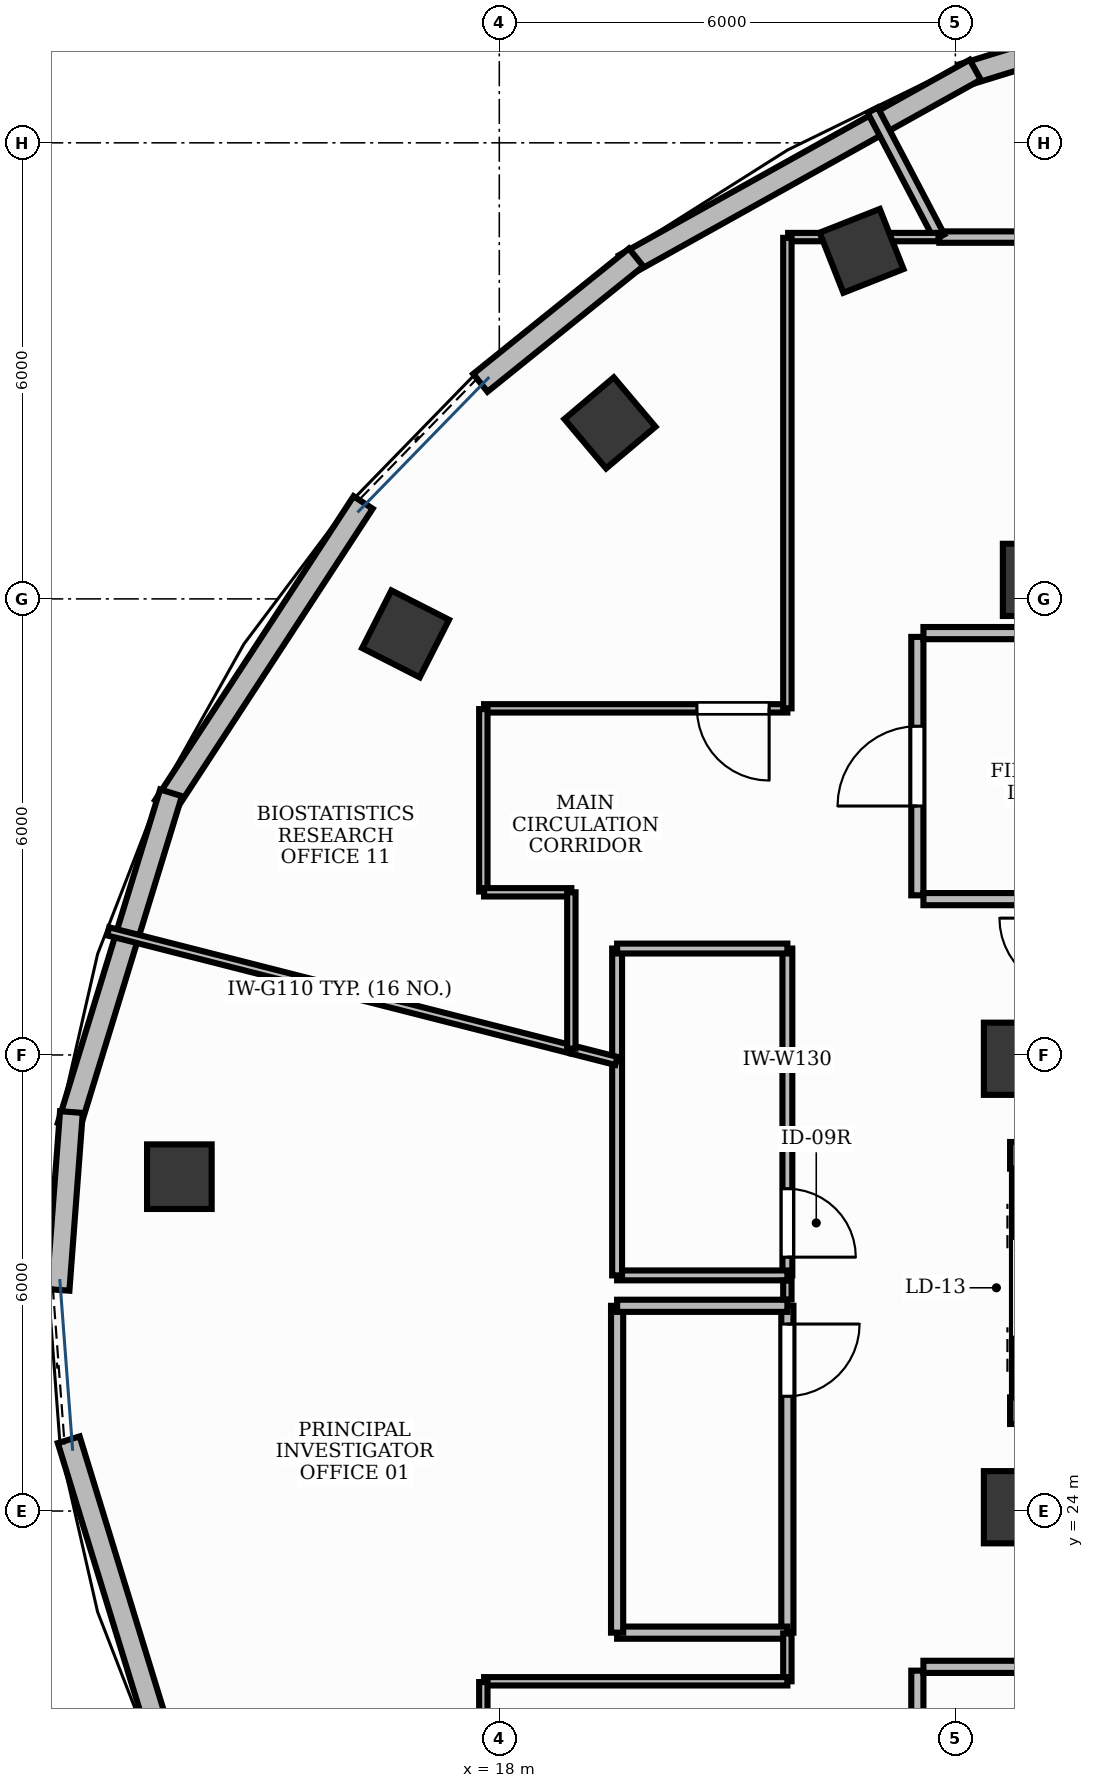
"""IFC4 building model, lengths in metres.
Left out: names, types, materials, properties, quantities, classifications, styles, units other than length and angle.
Written with IfcOpenShell. Run it as: python <this file> out.ifc"""

import sys

from ifc_helpers import new_model, si_unit, direction, frame, frame_2d, origin, origin_2d, place, context, subcontext, project, spatial, rectangle, extrude, element, fill, save


model = new_model("IFC4")
c1 = context("Model", 3, precision=1e-05, world=origin(), true_north=direction((0.0, 1.0)))
c2 = subcontext(c1, "Body", "Model", "MODEL_VIEW")
j1 = project(units=[si_unit("LENGTHUNIT", "METRE"), si_unit("PLANEANGLEUNIT", "RADIAN")], contexts=[c1])
p1 = place(None, origin())
s1 = spatial("IfcSite", under=j1, at=p1, CompositionType="ELEMENT")
p2 = place(p1, origin())
s2 = spatial("IfcBuilding", under=s1, at=p2, CompositionType="ELEMENT")
p3 = place(p2, frame((0.0, 0.0, 306.0)))
s3 = spatial("IfcBuildingStorey", under=s2, at=p3, CompositionType="ELEMENT", Elevation=306.0)
for number, where, z_axis, x_axis in (
    (1, (24.72, 28.68, 0.0), (0.0, 0.0, 1.0), (1.0, 0.0, 0.0)),
    (2, (24.72, 25.32, 0.0), (0.0, 0.0, 1.0), (1.0, 0.0, 0.0)),
):
    element("IfcWall", number, at=place(p3, frame(where, z_axis=z_axis, x_axis=x_axis)), inside=s3, PredefinedType="SHEAR", context=c2, shape_type="SweptSolid", body=[
        extrude(rectangle(XDim=3.21, YDim=0.35, at=frame_2d((1.605, 0.0))), origin(), (0.0, 0.0, 1.0), 3.9),
    ])
p4 = place(p3, frame((24.92, 25.497, 0.0), z_axis=(0.0, 0.0, 1.0), x_axis=(0.0, 1.0, 0.0)))
e3 = element("IfcWall", 3, at=p4, inside=s3, PredefinedType="SHEAR", context=c2, shape_type="SweptSolid", body=[
    extrude(rectangle(XDim=3.006, YDim=0.35, at=frame_2d((1.503, 0.0))), origin(), (0.0, 0.0, 1.0), 3.9),
])
p5 = place(p4, frame((0.79, 0.0, 0.0)))
e4 = element("IfcOpeningElement", 4, at=p5, cuts=e3, PredefinedType="OPENING", context=c2, shape_type="SweptSolid", body=[
    extrude(rectangle(XDim=1.3, YDim=2.2, at=frame_2d((0.65, 1.1))), frame((0.0, 0.19, 0.0), z_axis=(0.0, -1.0, 0.0), x_axis=(1.0, 0.0, 0.0)), (0.0, 0.0, 1.0), 0.38),
])
for number, where, z_axis, x_axis in (
    (5, (25.1, 36.25, -0.0), (0.0, 0.0, 1.0), (1.0, 0.0, 0.0)),
    (6, (24.85, 29.95, -0.0), (0.0, 0.0, 1.0), (1.0, 0.0, 0.0)),
    (7, (24.85, 24.05, -0.0), (0.0, 0.0, 1.0), (1.0, 0.0, 0.0)),
):
    element("IfcColumn", number, at=place(p3, frame(where, z_axis=z_axis, x_axis=x_axis)), inside=s3, PredefinedType="PILASTER", context=c2, shape_type="SweptSolid", body=[
        extrude(rectangle(XDim=0.95, YDim=0.95, at=origin_2d()), origin(), (0.0, 0.0, 1.0), 3.901),
    ])
for number, where, z_axis, x_axis in (
    (8, (22.766, 40.579, -0.0), (0.0, 0.0, 1.0), (0.93, 0.367, 0.0)),
    (9, (19.456, 38.315, -0.0), (0.0, 0.0, 1.0), (0.764, 0.645, 0.0)),
    (10, (16.767, 35.54, -0.0), (0.0, 0.0, 1.0), (0.453, 0.891, 0.0)),
    (11, (13.791, 28.399, -0.0), (0.0, 0.0, 1.0), (0.0, 1.0, 0.0)),
):
    element("IfcColumn", number, at=place(p3, frame(where, z_axis=z_axis, x_axis=x_axis)), inside=s3, PredefinedType="COLUMN", context=c2, shape_type="SweptSolid", body=[
        extrude(rectangle(XDim=0.85, YDim=0.85, at=origin_2d()), origin(), (0.0, 0.0, 1.0), 3.901),
    ])
p6 = place(p3, frame((29.33, 44.505, 0.0), z_axis=(0.0, 0.0, 1.0), x_axis=(-0.955535200816, -0.29487705913, 0.0)))
e12 = element("IfcWall", 12, at=p6, inside=s3, PredefinedType="STANDARD", context=c2, shape_type="SweptSolid", body=[
    extrude(rectangle(XDim=5.485, YDim=0.3, at=frame_2d((2.743, 0.0))), origin(), (0.0, 0.0, 1.0), 3.47),
])
p7 = place(p3, frame((24.262, 42.962, 0.0), z_axis=(0.0, 0.0, 1.0), x_axis=(-0.87350676692, -0.486812004932, 0.0)))
e13 = element("IfcWall", 13, at=p7, inside=s3, PredefinedType="STANDARD", context=c2, shape_type="SweptSolid", body=[
    extrude(rectangle(XDim=5.282, YDim=0.3, at=frame_2d((2.641, 0.0))), origin(), (0.0, 0.0, 1.0), 3.47),
])
p8 = place(p3, frame((19.8, 40.493, 0.0), z_axis=(0.0, 0.0, 1.0), x_axis=(-0.778800498168, -0.627271698751, 0.0)))
e14 = element("IfcWall", 14, at=p8, inside=s3, PredefinedType="STANDARD", context=c2, shape_type="SweptSolid", body=[
    extrude(rectangle(XDim=2.631, YDim=0.3, at=frame_2d((1.315, 0.0))), origin(), (0.0, 0.0, 1.0), 3.9),
])
p9 = place(p3, frame((16.208, 37.269, 0.0), z_axis=(0.0, 0.0, 1.0), x_axis=(-0.546723072071, -0.837313491152, 0.0)))
e15 = element("IfcWall", 15, at=p9, inside=s3, PredefinedType="STANDARD", context=c2, shape_type="SweptSolid", body=[
    extrude(rectangle(XDim=4.775, YDim=0.3, at=frame_2d((2.388, 0.0))), origin(), (0.0, 0.0, 1.0), 3.9),
])
p10 = place(p3, frame((13.681, 33.449, 0.0), z_axis=(0.0, 0.0, 1.0), x_axis=(-0.293311854667, -0.956016817797, 0.0)))
e16 = element("IfcWall", 16, at=p10, inside=s3, PredefinedType="STANDARD", context=c2, shape_type="SweptSolid", body=[
    extrude(rectangle(XDim=4.589, YDim=0.3, at=frame_2d((2.294, 0.0))), origin(), (0.0, 0.0, 1.0), 3.9),
])
p11 = place(p3, frame((12.371, 29.249, 0.0), z_axis=(0.0, 0.0, 1.0), x_axis=(-0.075040925575, -0.997180454827, 0.0)))
e17 = element("IfcWall", 17, at=p11, inside=s3, PredefinedType="STANDARD", context=c2, shape_type="SweptSolid", body=[
    extrude(rectangle(XDim=2.346, YDim=0.3, at=frame_2d((1.173, 0.0))), origin(), (0.0, 0.0, 1.0), 3.9),
])
p12 = place(p3, frame((12.335, 24.938, 0.0), z_axis=(0.0, 0.0, 1.0), x_axis=(0.293311854667, -0.956016817797, 0.0)))
e18 = element("IfcWall", 18, at=p12, inside=s3, PredefinedType="STANDARD", context=c2, shape_type="SweptSolid", body=[
    extrude(rectangle(XDim=4.589, YDim=0.3, at=frame_2d((2.294, 0.0))), origin(), (0.0, 0.0, 1.0), 3.9),
])
p13 = place(p3, frame((23.5, 32.1, 0.0), z_axis=(0.0, 0.0, 1.0), x_axis=(0.0, 1.0, 0.0)))
e19 = element("IfcWall", 19, at=p13, inside=s3, PredefinedType="PARTITIONING", context=c2, shape_type="SweptSolid", body=[
    extrude(rectangle(XDim=3.4, YDim=0.16, at=frame_2d((1.7, 0.0))), origin(), (0.0, 0.0, 1.0), 2.91),
])
p14 = place(p13, frame((1.175, 0.0, 0.0)))
e20 = element("IfcOpeningElement", 20, at=p14, cuts=e19, PredefinedType="OPENING", context=c2, shape_type="SweptSolid", body=[
    extrude(rectangle(XDim=1.05, YDim=2.15, at=frame_2d((0.525, 1.075))), frame((0.0, 0.095, 0.0), z_axis=(0.0, -1.0, 0.0), x_axis=(1.0, 0.0, 0.0)), (0.0, 0.0, 1.0), 0.19),
])
p15 = place(p3, frame((23.5, 18.5, 0.0), z_axis=(0.0, 0.0, 1.0), x_axis=(0.0, 1.0, 0.0)))
e21 = element("IfcWall", 21, at=p15, inside=s3, PredefinedType="PARTITIONING", context=c2, shape_type="SweptSolid", body=[
    extrude(rectangle(XDim=3.4, YDim=0.16, at=frame_2d((1.7, 0.0))), origin(), (0.0, 0.0, 1.0), 2.91),
])
p16 = place(p15, frame((1.175, 0.0, 0.0)))
e22 = element("IfcOpeningElement", 22, at=p16, cuts=e21, PredefinedType="OPENING", context=c2, shape_type="SweptSolid", body=[
    extrude(rectangle(XDim=1.05, YDim=2.15, at=frame_2d((0.525, 1.075))), frame((0.0, 0.095, 0.0), z_axis=(0.0, -1.0, 0.0), x_axis=(1.0, 0.0, 0.0)), (0.0, 0.0, 1.0), 0.19),
])
p17 = place(p3, frame((23.58, 32.05, 0.0), z_axis=(0.0, 0.0, 1.0), x_axis=(1.0, 0.0, 0.0)))
e23 = element("IfcWall", 23, at=p17, inside=s3, PredefinedType="PARTITIONING", context=c2, shape_type="SweptSolid", body=[
    extrude(rectangle(XDim=4.97, YDim=0.16, at=frame_2d((2.485, 0.0))), origin(), (0.0, 0.0, 1.0), 2.91),
])
p18 = place(p3, frame((23.58, 35.55, 0.0), z_axis=(0.0, 0.0, 1.0), x_axis=(1.0, 0.0, 0.0)))
e24 = element("IfcWall", 24, at=p18, inside=s3, PredefinedType="PARTITIONING", context=c2, shape_type="SweptSolid", body=[
    extrude(rectangle(XDim=2.12, YDim=0.16, at=frame_2d((1.06, 0.0))), origin(), (0.0, 0.0, 1.0), 2.91),
])
p19 = place(p3, frame((23.58, 21.95, 0.0), z_axis=(0.0, 0.0, 1.0), x_axis=(1.0, 0.0, 0.0)))
e25 = element("IfcWall", 25, at=p19, inside=s3, PredefinedType="PARTITIONING", context=c2, shape_type="SweptSolid", body=[
    extrude(rectangle(XDim=4.97, YDim=0.16, at=frame_2d((2.485, 0.0))), origin(), (0.0, 0.0, 1.0), 2.91),
])
p20 = place(p3, frame((21.79, 26.7, 0.0), z_axis=(0.0, 0.0, 1.0), x_axis=(0.0, -1.0, 0.0)))
e26 = element("IfcWall", 26, at=p20, inside=s3, PredefinedType="PARTITIONING", context=c2, shape_type="SweptSolid", body=[
    extrude(rectangle(XDim=4.3, YDim=0.16, at=frame_2d((2.15, 0.0))), origin(), (0.0, 0.0, 1.0), 2.91),
])
p21 = place(p20, frame((0.24, 0.0, 0.0)))
e27 = element("IfcOpeningElement", 27, at=p21, cuts=e26, PredefinedType="OPENING", context=c2, shape_type="SweptSolid", body=[
    extrude(rectangle(XDim=0.95, YDim=2.15, at=frame_2d((0.475, 1.075))), frame((0.0, 0.095, 0.0), z_axis=(0.0, -1.0, 0.0), x_axis=(1.0, 0.0, 0.0)), (0.0, 0.0, 1.0), 0.19),
])
p22 = place(p3, frame((21.79, 31.4, 0.0), z_axis=(0.0, 0.0, 1.0), x_axis=(0.0, -1.0, 0.0)))
e28 = element("IfcWall", 28, at=p22, inside=s3, PredefinedType="PARTITIONING", context=c2, shape_type="SweptSolid", body=[
    extrude(rectangle(XDim=4.3, YDim=0.13, at=frame_2d((2.15, 0.0))), origin(), (0.0, 0.0, 1.0), 2.91),
])
p23 = place(p22, frame((3.16, 0.0, 0.0)))
e29 = element("IfcOpeningElement", 29, at=p23, cuts=e28, PredefinedType="OPENING", context=c2, shape_type="SweptSolid", body=[
    extrude(rectangle(XDim=0.9, YDim=2.15, at=frame_2d((0.45, 1.075))), frame((0.0, 0.08, 0.0), z_axis=(0.0, -1.0, 0.0), x_axis=(1.0, 0.0, 0.0)), (0.0, 0.0, 1.0), 0.16),
])
p24 = place(p3, frame((39.4, 40.76, 0.0), z_axis=(0.0, 0.0, 1.0), x_axis=(-1.0, 0.0, 0.0)))
e30 = element("IfcWall", 30, at=p24, inside=s3, PredefinedType="PARTITIONING", context=c2, shape_type="SweptSolid", body=[
    extrude(rectangle(XDim=15.611, YDim=0.15, at=frame_2d((7.805, 0.0))), origin(), (0.0, 0.0, 1.0), 2.91),
])
p25 = place(p24, frame((2.944, 0.0, 0.0)))
e31 = element("IfcOpeningElement", 31, at=p25, cuts=e30, PredefinedType="OPENING", context=c2, shape_type="SweptSolid", body=[
    extrude(rectangle(XDim=0.95, YDim=2.15, at=frame_2d((0.475, 1.075))), frame((0.0, 0.09, 0.0), z_axis=(0.0, -1.0, 0.0), x_axis=(1.0, 0.0, 0.0)), (0.0, 0.0, 1.0), 0.18),
])
p26 = place(p3, frame((21.79, 34.56, 0.0), z_axis=(0.0, 0.0, 1.0), x_axis=(-1.0, 0.0, 0.0)))
e32 = element("IfcWall", 32, at=p26, inside=s3, PredefinedType="MOVABLE", context=c2, shape_type="SweptSolid", body=[
    extrude(rectangle(XDim=3.99, YDim=0.11, at=frame_2d((1.995, 0.0))), origin(), (0.0, 0.0, 1.0), 2.91),
])
p27 = place(p26, frame((0.24, 0.0, 0.0)))
e33 = element("IfcOpeningElement", 33, at=p27, cuts=e32, PredefinedType="OPENING", context=c2, shape_type="SweptSolid", body=[
    extrude(rectangle(XDim=0.95, YDim=2.15, at=frame_2d((0.475, 1.075))), frame((0.0, 0.07, 0.0), z_axis=(0.0, -1.0, 0.0), x_axis=(1.0, 0.0, 0.0)), (0.0, 0.0, 1.0), 0.14),
])
p28 = place(p3, frame((21.79, 22.4, 0.0), z_axis=(0.0, 0.0, 1.0), x_axis=(-1.0, 0.0, 0.0)))
e34 = element("IfcWall", 34, at=p28, inside=s3, PredefinedType="PARTITIONING", context=c2, shape_type="SweptSolid", body=[
    extrude(rectangle(XDim=2.24, YDim=0.16, at=frame_2d((1.12, 0.0))), origin(), (0.0, 0.0, 1.0), 2.91),
])
p29 = place(p3, frame((19.55, 22.4, 0.0), z_axis=(0.0, 0.0, 1.0), x_axis=(0.0, 1.0, 0.0)))
e35 = element("IfcWall", 35, at=p29, inside=s3, PredefinedType="PARTITIONING", context=c2, shape_type="SweptSolid", body=[
    extrude(rectangle(XDim=4.3, YDim=0.16, at=frame_2d((2.15, 0.0))), origin(), (0.0, 0.0, 1.0), 2.91),
])
p30 = place(p3, frame((19.55, 26.7, 0.0), z_axis=(0.0, 0.0, 1.0), x_axis=(1.0, 0.0, 0.0)))
e36 = element("IfcWall", 36, at=p30, inside=s3, PredefinedType="PARTITIONING", context=c2, shape_type="SweptSolid", body=[
    extrude(rectangle(XDim=2.24, YDim=0.16, at=frame_2d((1.12, 0.0))), origin(), (0.0, 0.0, 1.0), 2.91),
])
p31 = place(p3, frame((21.79, 27.1, 0.0), z_axis=(0.0, 0.0, 1.0), x_axis=(-1.0, 0.0, 0.0)))
e37 = element("IfcWall", 37, at=p31, inside=s3, PredefinedType="PARTITIONING", context=c2, shape_type="SweptSolid", body=[
    extrude(rectangle(XDim=2.24, YDim=0.13, at=frame_2d((1.12, 0.0))), origin(), (0.0, 0.0, 1.0), 2.91),
])
p32 = place(p3, frame((19.55, 27.1, 0.0), z_axis=(0.0, 0.0, 1.0), x_axis=(0.0, 1.0, 0.0)))
e38 = element("IfcWall", 38, at=p32, inside=s3, PredefinedType="PARTITIONING", context=c2, shape_type="SweptSolid", body=[
    extrude(rectangle(XDim=4.3, YDim=0.13, at=frame_2d((2.15, 0.0))), origin(), (0.0, 0.0, 1.0), 2.91),
])
p33 = place(p3, frame((19.55, 31.4, 0.0), z_axis=(0.0, 0.0, 1.0), x_axis=(1.0, 0.0, 0.0)))
e39 = element("IfcWall", 39, at=p33, inside=s3, PredefinedType="PARTITIONING", context=c2, shape_type="SweptSolid", body=[
    extrude(rectangle(XDim=2.24, YDim=0.13, at=frame_2d((1.12, 0.0))), origin(), (0.0, 0.0, 1.0), 2.91),
])
p34 = place(p3, frame((12.854, 31.626, 0.0), z_axis=(0.0, 0.0, 1.0), x_axis=(0.96901544636, -0.247000131004, 0.0)))
e40 = element("IfcWall", 40, at=p34, inside=s3, PredefinedType="MOVABLE", context=c2, shape_type="SweptSolid", body=[
    extrude(rectangle(XDim=6.288, YDim=0.11, at=frame_2d((3.144, 0.0))), origin(), (0.0, 0.0, 1.0), 2.91),
])
p35 = place(p3, frame((18.952, 30.072, 0.0), z_axis=(0.0, 0.0, 1.0), x_axis=(0.968995646976, -0.247077793706, 0.0)))
e41 = element("IfcWall", 41, at=p35, inside=s3, PredefinedType="MOVABLE", context=c2, shape_type="SweptSolid", body=[
    extrude(rectangle(XDim=0.607, YDim=0.11, at=frame_2d((0.303, 0.0))), origin(), (0.0, 0.0, 1.0), 2.91),
])
p36 = place(p3, frame((21.79, 27.032, 0.0), z_axis=(0.0, 0.0, 1.0), x_axis=(0.0, -1.0, 0.0)))
e42 = element("IfcWall", 42, at=p36, inside=s3, PredefinedType="MOVABLE", context=c2, shape_type="SweptSolid", body=[
    extrude(rectangle(XDim=0.249, YDim=0.11, at=frame_2d((0.125, 0.0))), origin(), (0.0, 0.0, 1.0), 2.91),
])
p37 = place(p3, frame((21.79, 22.39, 0.0), z_axis=(0.0, 0.0, 1.0), x_axis=(0.0, -1.0, 0.0)))
e43 = element("IfcWall", 43, at=p37, inside=s3, PredefinedType="MOVABLE", context=c2, shape_type="SweptSolid", body=[
    extrude(rectangle(XDim=0.63, YDim=0.11, at=frame_2d((0.315, 0.0))), origin(), (0.0, 0.0, 1.0), 2.91),
])
p38 = place(p3, frame((21.79, 21.76, 0.0), z_axis=(0.0, 0.0, 1.0), x_axis=(-1.0, 0.0, 0.0)))
e44 = element("IfcWall", 44, at=p38, inside=s3, PredefinedType="MOVABLE", context=c2, shape_type="SweptSolid", body=[
    extrude(rectangle(XDim=3.99, YDim=0.11, at=frame_2d((1.995, 0.0))), origin(), (0.0, 0.0, 1.0), 2.91),
])
p39 = place(p3, frame((17.79, 21.75, 0.0), z_axis=(0.0, 0.0, 1.0), x_axis=(0.0, -1.0, 0.0)))
e45 = element("IfcWall", 45, at=p39, inside=s3, PredefinedType="MOVABLE", context=c2, shape_type="SweptSolid", body=[
    extrude(rectangle(XDim=2.4, YDim=0.11, at=frame_2d((1.2, 0.0))), origin(), (0.0, 0.0, 1.0), 2.91),
])
p40 = place(p3, frame((23.789, 40.76, 0.0), z_axis=(0.0, 0.0, 1.0), x_axis=(-0.464828826697, 0.885400565773, 0.0)))
e46 = element("IfcWall", 46, at=p40, inside=s3, PredefinedType="PARTITIONING", context=c2, shape_type="SweptSolid", body=[
    extrude(rectangle(XDim=1.887, YDim=0.15, at=frame_2d((0.943, 0.0))), origin(), (0.0, 0.0, 1.0), 2.91),
])
p41 = place(p3, frame((23.778, 40.76, 0.0), z_axis=(0.0, 0.0, 1.0), x_axis=(-1.0, 0.0, 0.0)))
e47 = element("IfcWall", 47, at=p41, inside=s3, PredefinedType="MOVABLE", context=c2, shape_type="SweptSolid", body=[
    extrude(rectangle(XDim=1.978, YDim=0.11, at=frame_2d((0.989, 0.0))), origin(), (0.0, 0.0, 1.0), 2.91),
])
p42 = place(p3, frame((21.79, 40.75, 0.0), z_axis=(0.0, 0.0, 1.0), x_axis=(0.0, -1.0, 0.0)))
e48 = element("IfcWall", 48, at=p42, inside=s3, PredefinedType="MOVABLE", context=c2, shape_type="SweptSolid", body=[
    extrude(rectangle(XDim=6.19, YDim=0.11, at=frame_2d((3.095, 0.0))), origin(), (0.0, 0.0, 1.0), 2.91),
])
p43 = place(p3, frame((17.79, 34.55, 0.0), z_axis=(0.0, 0.0, 1.0), x_axis=(0.0, -1.0, 0.0)))
e49 = element("IfcWall", 49, at=p43, inside=s3, PredefinedType="MOVABLE", context=c2, shape_type="SweptSolid", body=[
    extrude(rectangle(XDim=2.4, YDim=0.11, at=frame_2d((1.2, 0.0))), origin(), (0.0, 0.0, 1.0), 2.91),
])
p44 = place(p3, frame((17.8, 32.14, 0.0), z_axis=(0.0, 0.0, 1.0), x_axis=(1.0, 0.0, 0.0)))
e50 = element("IfcWall", 50, at=p44, inside=s3, PredefinedType="MOVABLE", context=c2, shape_type="SweptSolid", body=[
    extrude(rectangle(XDim=1.148, YDim=0.11, at=frame_2d((0.574, 0.0))), origin(), (0.0, 0.0, 1.0), 2.91),
])
p45 = place(p3, frame((18.948, 32.14, 0.0), z_axis=(0.0, 0.0, 1.0), x_axis=(0.0, -1.0, 0.0)))
e51 = element("IfcWall", 51, at=p45, inside=s3, PredefinedType="MOVABLE", context=c2, shape_type="SweptSolid", body=[
    extrude(rectangle(XDim=2.057, YDim=0.11, at=frame_2d((1.028, 0.0))), origin(), (0.0, 0.0, 1.0), 2.91),
])
p46 = place(p14, origin())
e52 = element("IfcDoor", 52, at=p46, inside=s3, OperationType="SINGLE_SWING_LEFT", PredefinedType="DOOR", context=c2, shape_type="SweptSolid", body=[
    extrude(rectangle(XDim=1.05, YDim=2.15, at=frame_2d((0.525, 1.075))), frame((0.0, 0.025, 0.0), z_axis=(0.0, -1.0, 0.0), x_axis=(1.0, 0.0, 0.0)), (0.0, 0.0, 1.0), 0.05),
])
fill(e20, e52)
p47 = place(p21, origin())
e53 = element("IfcDoor", 53, at=p47, inside=s3, OperationType="SINGLE_SWING_LEFT", PredefinedType="DOOR", context=c2, shape_type="SweptSolid", body=[
    extrude(rectangle(XDim=0.95, YDim=2.15, at=frame_2d((0.475, 1.075))), frame((0.0, 0.025, 0.0), z_axis=(0.0, -1.0, 0.0), x_axis=(1.0, 0.0, 0.0)), (0.0, 0.0, 1.0), 0.05),
])
fill(e27, e53)
p48 = place(p23, origin())
e54 = element("IfcDoor", 54, at=p48, inside=s3, OperationType="SINGLE_SWING_RIGHT", PredefinedType="DOOR", context=c2, shape_type="SweptSolid", body=[
    extrude(rectangle(XDim=0.9, YDim=2.15, at=frame_2d((0.45, 1.075))), frame((0.0, 0.025, 0.0), z_axis=(0.0, -1.0, 0.0), x_axis=(1.0, 0.0, 0.0)), (0.0, 0.0, 1.0), 0.05),
])
fill(e29, e54)
p49 = place(p27, origin())
e55 = element("IfcDoor", 55, at=p49, inside=s3, OperationType="SINGLE_SWING_LEFT", PredefinedType="DOOR", context=c2, shape_type="SweptSolid", body=[
    extrude(rectangle(XDim=0.95, YDim=2.15, at=frame_2d((0.475, 1.075))), frame((0.0, 0.025, 0.0), z_axis=(0.0, -1.0, 0.0), x_axis=(1.0, 0.0, 0.0)), (0.0, 0.0, 1.0), 0.05),
])
fill(e33, e55)
save(model, sys.argv[1])
